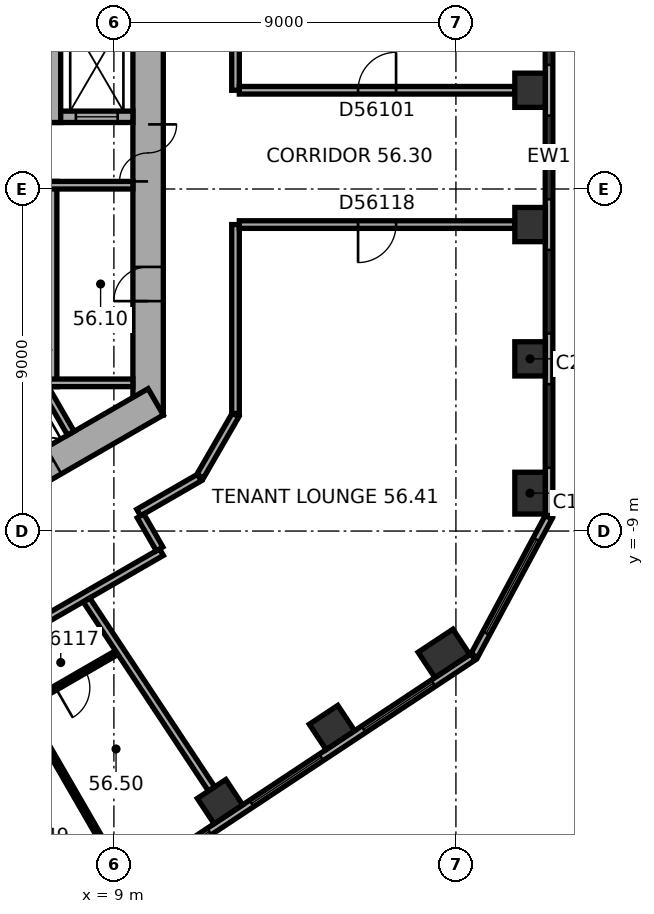
"""IFC4 building model, lengths in metres.
Left out: names, types, materials, properties, quantities, classifications, styles, units other than length and angle.
Written with IfcOpenShell. Run it as: python <this file> out.ifc"""

import sys

from ifc_helpers import new_model, si_unit, direction, frame, frame_2d, origin, origin_2d, place, context, subcontext, project, spatial, rectangle, extrude, element, fill, save


model = new_model("IFC4")
c1 = context("Model", 3, precision=1e-05, world=origin(), true_north=direction((0.0, 1.0)))
c2 = subcontext(c1, "Body", "Model", "MODEL_VIEW")
j1 = project(units=[si_unit("LENGTHUNIT", "METRE"), si_unit("PLANEANGLEUNIT", "RADIAN")], contexts=[c1])
p1 = place(None, origin())
s1 = spatial("IfcSite", under=j1, at=p1, CompositionType="ELEMENT")
p2 = place(p1, origin())
s2 = spatial("IfcBuilding", under=s1, at=p2, CompositionType="ELEMENT")
p3 = place(p2, frame((0.0, 0.0, 229.1)))
s3 = spatial("IfcBuildingStorey", under=s2, at=p3, CompositionType="ELEMENT", Elevation=229.1)
p4 = place(p3, frame((19.95, -8.003, 0.0), z_axis=(0.0, 0.0, 1.0), x_axis=(0.0, 1.0, 0.0)))
e1 = element("IfcColumn", 1, at=p4, inside=s3, PredefinedType="COLUMN", context=c2, shape_type="SweptSolid", body=[
    extrude(rectangle(XDim=1.1, YDim=0.8, at=origin_2d()), origin(), (0.0, 0.0, 1.0), 3.7),
])
for number, where, z_axis, x_axis in (
    (2, (19.95, -4.469, 0.0), (0.0, 0.0, 1.0), (0.0, 1.0, 0.0)),
    (3, (19.95, -0.936, 0.0), (0.0, 0.0, 1.0), (0.0, 1.0, 0.0)),
    (4, (19.95, 2.598, 0.0), (0.0, 0.0, 1.0), (0.0, 1.0, 0.0)),
    (5, (11.791, -16.12, 0.0), (0.0, 0.0, 1.0), (0.834, 0.552, 0.0)),
    (6, (14.738, -14.169, 0.0), (0.0, 0.0, 1.0), (0.834, 0.552, 0.0)),
):
    element("IfcColumn", number, at=place(p3, frame(where, z_axis=z_axis, x_axis=x_axis)), inside=s3, PredefinedType="COLUMN", context=c2, shape_type="SweptSolid", body=[
        extrude(rectangle(XDim=0.9, YDim=0.8, at=origin_2d()), origin(), (0.0, 0.0, 1.0), 3.7),
    ])
p5 = place(p3, frame((17.685, -12.219, 0.0), z_axis=(0.0, 0.0, 1.0), x_axis=(0.833885822067, 0.551936985312, 0.0)))
e7 = element("IfcColumn", 7, at=p5, inside=s3, PredefinedType="COLUMN", context=c2, shape_type="SweptSolid", body=[
    extrude(rectangle(XDim=1.1, YDim=0.8, at=origin_2d()), origin(), (0.0, 0.0, 1.0), 3.7),
])
p6 = place(p3, frame((9.9, -5.947, 0.0), z_axis=(0.0, 0.0, 1.0), x_axis=(0.0, 1.0, 0.0)))
e8 = element("IfcWall", 8, at=p6, inside=s3, PredefinedType="SHEAR", context=c2, shape_type="SweptSolid", body=[
    extrude(rectangle(XDim=11.894, YDim=0.8, at=frame_2d((5.947, 0.0))), origin(), (0.0, 0.0, 1.0), 3.7),
])
p7 = place(p6, frame((6.147, 0.0, 0.0)))
e9 = element("IfcOpeningElement", 9, at=p7, cuts=e8, PredefinedType="OPENING", context=c2, shape_type="SweptSolid", body=[
    extrude(rectangle(XDim=1.5, YDim=2.1, at=frame_2d((0.75, 1.05))), frame((0.0, 0.41, 0.0), z_axis=(0.0, -1.0, 0.0), x_axis=(1.0, 0.0, 0.0)), (0.0, 0.0, 1.0), 0.82),
])
p8 = place(p6, frame((2.997, 0.0, 0.0)))
e10 = element("IfcOpeningElement", 10, at=p8, cuts=e8, PredefinedType="OPENING", context=c2, shape_type="SweptSolid", body=[
    extrude(rectangle(XDim=0.9, YDim=2.1, at=frame_2d((0.45, 1.05))), frame((0.0, 0.41, 0.0), z_axis=(0.0, -1.0, 0.0), x_axis=(1.0, 0.0, 0.0)), (0.0, 0.0, 1.0), 0.82),
])
p9 = place(p3, frame((-0.2, -11.547, 0.0), z_axis=(0.0, 0.0, 1.0), x_axis=(0.866023897231, 0.500002609418, 0.0)))
e11 = element("IfcWall", 11, at=p9, inside=s3, PredefinedType="SHEAR", context=c2, shape_type="SweptSolid", body=[
    extrude(rectangle(XDim=11.894, YDim=0.8, at=frame_2d((5.947, 0.0))), origin(), (0.0, 0.0, 1.0), 3.7),
])
p10 = place(p9, frame((2.497, 0.0, 0.0)))
e12 = element("IfcOpeningElement", 12, at=p10, cuts=e11, PredefinedType="OPENING", context=c2, shape_type="SweptSolid", body=[
    extrude(rectangle(XDim=1.1, YDim=2.1, at=frame_2d((0.55, 1.05))), frame((0.0, 0.41, 0.0), z_axis=(0.0, -1.0, 0.0), x_axis=(1.0, 0.0, 0.0)), (0.0, 0.0, 1.0), 0.82),
])
p11 = place(p9, frame((5.097, 0.0, 0.0)))
e13 = element("IfcOpeningElement", 13, at=p11, cuts=e11, PredefinedType="OPENING", context=c2, shape_type="SweptSolid", body=[
    extrude(rectangle(XDim=1.1, YDim=2.1, at=frame_2d((0.55, 1.05))), frame((0.0, 0.41, 0.0), z_axis=(0.0, -1.0, 0.0), x_axis=(1.0, 0.0, 0.0)), (0.0, 0.0, 1.0), 0.82),
])
p12 = place(p9, frame((7.697, 0.0, 0.0)))
e14 = element("IfcOpeningElement", 14, at=p12, cuts=e11, PredefinedType="OPENING", context=c2, shape_type="SweptSolid", body=[
    extrude(rectangle(XDim=1.1, YDim=2.1, at=frame_2d((0.55, 1.05))), frame((0.0, 0.41, 0.0), z_axis=(0.0, -1.0, 0.0), x_axis=(1.0, 0.0, 0.0)), (0.0, 0.0, 1.0), 0.82),
])
p13 = place(p3, frame((20.45, -8.59, 0.0), z_axis=(0.0, 0.0, 1.0), x_axis=(0.0, 1.0, 0.0)))
e15 = element("IfcWall", 15, at=p13, inside=s3, PredefinedType="STANDARD", context=c2, shape_type="SweptSolid", body=[
    extrude(rectangle(XDim=18.841, YDim=0.2, at=frame_2d((9.421, 0.0))), origin(), (0.0, 0.0, 1.0), 3.7),
])
p14 = place(p13, frame((1.254, 0.0, 0.9)))
e16 = element("IfcOpeningElement", 16, at=p14, cuts=e15, PredefinedType="OPENING", context=c2, shape_type="SweptSolid", body=[
    extrude(rectangle(XDim=2.2, YDim=2.0, at=frame_2d((1.1, 1.0))), frame((0.0, 0.11, 0.0), z_axis=(0.0, -1.0, 0.0), x_axis=(1.0, 0.0, 0.0)), (0.0, 0.0, 1.0), 0.22),
])
p15 = place(p13, frame((4.788, 0.0, 0.9)))
e17 = element("IfcOpeningElement", 17, at=p15, cuts=e15, PredefinedType="OPENING", context=c2, shape_type="SweptSolid", body=[
    extrude(rectangle(XDim=2.2, YDim=2.0, at=frame_2d((1.1, 1.0))), frame((0.0, 0.11, 0.0), z_axis=(0.0, -1.0, 0.0), x_axis=(1.0, 0.0, 0.0)), (0.0, 0.0, 1.0), 0.22),
])
p16 = place(p13, frame((8.322, 0.0, 0.9)))
e18 = element("IfcOpeningElement", 18, at=p16, cuts=e15, PredefinedType="OPENING", context=c2, shape_type="SweptSolid", body=[
    extrude(rectangle(XDim=2.2, YDim=2.0, at=frame_2d((1.1, 1.0))), frame((0.0, 0.11, 0.0), z_axis=(0.0, -1.0, 0.0), x_axis=(1.0, 0.0, 0.0)), (0.0, 0.0, 1.0), 0.22),
])
p17 = place(p13, frame((11.855, 0.0, 0.9)))
e19 = element("IfcOpeningElement", 19, at=p17, cuts=e15, PredefinedType="OPENING", context=c2, shape_type="SweptSolid", body=[
    extrude(rectangle(XDim=2.2, YDim=2.0, at=frame_2d((1.1, 1.0))), frame((0.0, 0.11, 0.0), z_axis=(0.0, -1.0, 0.0), x_axis=(1.0, 0.0, 0.0)), (0.0, 0.0, 1.0), 0.22),
])
p18 = place(p13, frame((15.389, 0.0, 0.9)))
e20 = element("IfcOpeningElement", 20, at=p18, cuts=e15, PredefinedType="OPENING", context=c2, shape_type="SweptSolid", body=[
    extrude(rectangle(XDim=2.2, YDim=2.0, at=frame_2d((1.1, 1.0))), frame((0.0, 0.11, 0.0), z_axis=(0.0, -1.0, 0.0), x_axis=(1.0, 0.0, 0.0)), (0.0, 0.0, 1.0), 0.22),
])
p19 = place(p3, frame((2.739, -22.711, 0.0), z_axis=(0.0, 0.0, 1.0), x_axis=(0.833885723098, 0.551937134838, 0.0)))
e21 = element("IfcWall", 21, at=p19, inside=s3, PredefinedType="STANDARD", context=c2, shape_type="SweptSolid", body=[
    extrude(rectangle(XDim=18.841, YDim=0.2, at=frame_2d((9.421, 0.0))), origin(), (0.0, 0.0, 1.0), 3.7),
])
p20 = place(p19, frame((1.252, 0.0, 0.9)))
e22 = element("IfcOpeningElement", 22, at=p20, cuts=e21, PredefinedType="OPENING", context=c2, shape_type="SweptSolid", body=[
    extrude(rectangle(XDim=2.2, YDim=2.0, at=frame_2d((1.1, 1.0))), frame((0.0, 0.11, 0.0), z_axis=(0.0, -1.0, 0.0), x_axis=(1.0, 0.0, 0.0)), (0.0, 0.0, 1.0), 0.22),
])
p21 = place(p19, frame((4.786, 0.0, 0.9)))
e23 = element("IfcOpeningElement", 23, at=p21, cuts=e21, PredefinedType="OPENING", context=c2, shape_type="SweptSolid", body=[
    extrude(rectangle(XDim=2.2, YDim=2.0, at=frame_2d((1.1, 1.0))), frame((0.0, 0.11, 0.0), z_axis=(0.0, -1.0, 0.0), x_axis=(1.0, 0.0, 0.0)), (0.0, 0.0, 1.0), 0.22),
])
p22 = place(p19, frame((8.32, 0.0, 0.9)))
e24 = element("IfcOpeningElement", 24, at=p22, cuts=e21, PredefinedType="OPENING", context=c2, shape_type="SweptSolid", body=[
    extrude(rectangle(XDim=2.2, YDim=2.0, at=frame_2d((1.1, 1.0))), frame((0.0, 0.11, 0.0), z_axis=(0.0, -1.0, 0.0), x_axis=(1.0, 0.0, 0.0)), (0.0, 0.0, 1.0), 0.22),
])
p23 = place(p19, frame((11.854, 0.0, 0.9)))
e25 = element("IfcOpeningElement", 25, at=p23, cuts=e21, PredefinedType="OPENING", context=c2, shape_type="SweptSolid", body=[
    extrude(rectangle(XDim=2.2, YDim=2.0, at=frame_2d((1.1, 1.0))), frame((0.0, 0.11, 0.0), z_axis=(0.0, -1.0, 0.0), x_axis=(1.0, 0.0, 0.0)), (0.0, 0.0, 1.0), 0.22),
])
p24 = place(p19, frame((15.387, 0.0, 0.9)))
e26 = element("IfcOpeningElement", 26, at=p24, cuts=e21, PredefinedType="OPENING", context=c2, shape_type="SweptSolid", body=[
    extrude(rectangle(XDim=2.2, YDim=2.0, at=frame_2d((1.1, 1.0))), frame((0.0, 0.11, 0.0), z_axis=(0.0, -1.0, 0.0), x_axis=(1.0, 0.0, 0.0)), (0.0, 0.0, 1.0), 0.22),
])
p25 = place(p3, frame((18.483, -12.276, 0.0), z_axis=(0.0, 0.0, 1.0), x_axis=(0.473267675015, 0.880918672629, 0.0)))
e27 = element("IfcWall", 27, at=p25, inside=s3, PredefinedType="STANDARD", context=c2, shape_type="SweptSolid", body=[
    extrude(rectangle(XDim=4.13, YDim=0.2, at=frame_2d((2.065, 0.0))), origin(), (0.0, 0.0, 1.0), 3.7),
])
p26 = place(p25, frame((0.665, 0.0, 0.9)))
e28 = element("IfcOpeningElement", 28, at=p26, cuts=e27, PredefinedType="OPENING", context=c2, shape_type="SweptSolid", body=[
    extrude(rectangle(XDim=2.8, YDim=2.0, at=frame_2d((1.4, 1.0))), frame((0.0, 0.11, 0.0), z_axis=(0.0, -1.0, 0.0), x_axis=(1.0, 0.0, 0.0)), (0.0, 0.0, 1.0), 0.22),
])
p27 = place(p3, frame((7.4, -5.2, 0.0), z_axis=(0.0, 0.0, 1.0), x_axis=(0.0, 1.0, 0.0)))
e29 = element("IfcWall", 29, at=p27, inside=s3, PredefinedType="PARTITIONING", context=c2, shape_type="SweptSolid", body=[
    extrude(rectangle(XDim=5.4, YDim=0.2, at=frame_2d((2.7, 0.0))), origin(), (0.0, 0.0, 1.0), 3.42),
])
for number, where, z_axis, x_axis in (
    (30, (7.3, -5.1, 0.0), (0.0, 0.0, 1.0), (1.0, 0.0, 0.0)),
    (31, (7.3, 0.1, 0.0), (0.0, 0.0, 1.0), (1.0, 0.0, 0.0)),
    (32, (6.768, -4.522, 0.0), (0.0, 0.0, 1.0), (0.5, -0.866, 0.0)),
):
    element("IfcWall", number, at=place(p3, frame(where, z_axis=z_axis, x_axis=x_axis)), inside=s3, PredefinedType="PARTITIONING", context=c2, shape_type="SweptSolid", body=[
        extrude(rectangle(XDim=2.2, YDim=0.2, at=frame_2d((1.1, 0.0))), origin(), (0.0, 0.0, 1.0), 3.42),
    ])
p28 = place(p3, frame((7.3, 1.9, 0.0), z_axis=(0.0, 0.0, 1.0), x_axis=(1.0, 0.0, 0.0)))
e33 = element("IfcWall", 33, at=p28, inside=s3, PredefinedType="SHEAR", context=c2, shape_type="SweptSolid", body=[
    extrude(rectangle(XDim=2.2, YDim=0.3, at=frame_2d((1.1, 0.0))), origin(), (0.0, 0.0, 1.0), 3.42),
])
p29 = place(p28, frame((0.7, 0.0, 0.0)))
e34 = element("IfcOpeningElement", 34, at=p29, cuts=e33, PredefinedType="OPENING", context=c2, shape_type="SweptSolid", body=[
    extrude(rectangle(XDim=1.1, YDim=2.1, at=frame_2d((0.55, 1.05))), frame((0.0, 0.16, 0.0), z_axis=(0.0, -1.0, 0.0), x_axis=(1.0, 0.0, 0.0)), (0.0, 0.0, 1.0), 0.32),
])
p30 = place(p3, frame((7.45, 1.75, 0.0), z_axis=(0.0, 0.0, 1.0), x_axis=(0.0, 1.0, 0.0)))
e35 = element("IfcWall", 35, at=p30, inside=s3, PredefinedType="SHEAR", context=c2, shape_type="SweptSolid", body=[
    extrude(rectangle(XDim=3.35, YDim=0.3, at=frame_2d((1.675, 0.0))), origin(), (0.0, 0.0, 1.0), 3.42),
])
p31 = place(p3, frame((2.716, -13.906, 0.0), z_axis=(0.0, 0.0, 1.0), x_axis=(0.866040290674, 0.499974214264, 0.0)))
e36 = element("IfcWall", 36, at=p31, inside=s3, PredefinedType="PARTITIONING", context=c2, shape_type="SweptSolid", body=[
    extrude(rectangle(XDim=8.702, YDim=0.2, at=frame_2d((4.351, 0.0))), origin(), (0.0, 0.0, 1.0), 3.42),
])
p32 = place(p31, frame((2.679, 0.0, 0.0)))
e37 = element("IfcOpeningElement", 37, at=p32, cuts=e36, PredefinedType="OPENING", context=c2, shape_type="SweptSolid", body=[
    extrude(rectangle(XDim=1.0, YDim=2.1, at=frame_2d((0.5, 1.05))), frame((0.0, 0.11, 0.0), z_axis=(0.0, -1.0, 0.0), x_axis=(1.0, 0.0, 0.0)), (0.0, 0.0, 1.0), 0.22),
])
p33 = place(p3, frame((3.117, -15.638, 0.0), z_axis=(0.0, 0.0, 1.0), x_axis=(0.866031365477, 0.499989673903, 0.0)))
e38 = element("IfcWall", 38, at=p33, inside=s3, PredefinedType="PARTITIONING", context=c2, shape_type="SweptSolid", body=[
    extrude(rectangle(XDim=6.881, YDim=0.12, at=frame_2d((3.44, 0.0))), origin(), (0.0, 0.0, 1.0), 3.42),
])
p34 = place(p33, frame((0.5, 0.0, 0.0)))
e39 = element("IfcOpeningElement", 39, at=p34, cuts=e38, PredefinedType="OPENING", context=c2, shape_type="SweptSolid", body=[
    extrude(rectangle(XDim=1.0, YDim=2.1, at=frame_2d((0.5, 1.05))), frame((0.0, 0.07, 0.0), z_axis=(0.0, -1.0, 0.0), x_axis=(1.0, 0.0, 0.0)), (0.0, 0.0, 1.0), 0.14),
])
p35 = place(p33, frame((2.583, 0.0, 0.0)))
e40 = element("IfcOpeningElement", 40, at=p35, cuts=e38, PredefinedType="OPENING", context=c2, shape_type="SweptSolid", body=[
    extrude(rectangle(XDim=0.9, YDim=2.1, at=frame_2d((0.45, 1.05))), frame((0.0, 0.07, 0.0), z_axis=(0.0, -1.0, 0.0), x_axis=(1.0, 0.0, 0.0)), (0.0, 0.0, 1.0), 0.14),
])
p36 = place(p33, frame((5.023, 0.0, 0.0)))
e41 = element("IfcOpeningElement", 41, at=p36, cuts=e38, PredefinedType="OPENING", context=c2, shape_type="SweptSolid", body=[
    extrude(rectangle(XDim=0.9, YDim=2.1, at=frame_2d((0.45, 1.05))), frame((0.0, 0.07, 0.0), z_axis=(0.0, -1.0, 0.0), x_axis=(1.0, 0.0, 0.0)), (0.0, 0.0, 1.0), 0.14),
])
p37 = place(p3, frame((8.912, -17.545, 0.0), z_axis=(0.0, 0.0, 1.0), x_axis=(-0.500022113525, 0.866012636158, 0.0)))
e42 = element("IfcWall", 42, at=p37, inside=s3, PredefinedType="PARTITIONING", context=c2, shape_type="SweptSolid", body=[
    extrude(rectangle(XDim=4.49, YDim=0.12, at=frame_2d((2.245, 0.0))), origin(), (0.0, 0.0, 1.0), 2.87),
])
p38 = place(p3, frame((9.652, -8.515, 0.0), z_axis=(0.0, 0.0, 1.0), x_axis=(0.866020375458, 0.500008709215, 0.0)))
e43 = element("IfcWall", 43, at=p38, inside=s3, PredefinedType="PARTITIONING", context=c2, shape_type="SweptSolid", body=[
    extrude(rectangle(XDim=1.846, YDim=0.2, at=frame_2d((0.923, 0.0))), origin(), (0.0, 0.0, 1.0), 3.42),
])
p39 = place(p3, frame((10.202, -9.469, 0.0), z_axis=(0.0, 0.0, 1.0), x_axis=(-0.499968756647, 0.866043441391, 0.0)))
e44 = element("IfcWall", 44, at=p39, inside=s3, PredefinedType="PARTITIONING", context=c2, shape_type="SweptSolid", body=[
    extrude(rectangle(XDim=1.001, YDim=0.2, at=frame_2d((0.5, 0.0))), origin(), (0.0, 0.0, 1.0), 3.42),
])
p40 = place(p3, frame((11.27, -7.558, 0.0), z_axis=(0.0, 0.0, 1.0), x_axis=(0.499964847546, 0.866045698112, 0.0)))
e45 = element("IfcWall", 45, at=p40, inside=s3, PredefinedType="PARTITIONING", context=c2, shape_type="SweptSolid", body=[
    extrude(rectangle(XDim=1.86, YDim=0.2, at=frame_2d((0.93, 0.0))), origin(), (0.0, 0.0, 1.0), 3.42),
])
p41 = place(p3, frame((11.571, -15.786, 0.0), z_axis=(0.0, 0.0, 1.0), x_axis=(-0.551944861763, 0.833880608705, 0.0)))
e46 = element("IfcWall", 46, at=p41, inside=s3, PredefinedType="PARTITIONING", context=c2, shape_type="SweptSolid", body=[
    extrude(rectangle(XDim=5.957, YDim=0.2, at=frame_2d((2.979, 0.0))), origin(), (0.0, 0.0, 1.0), 3.42),
])
p42 = place(p3, frame((12.2, -5.907, 0.0), z_axis=(0.0, 0.0, 1.0), x_axis=(0.0, 1.0, 0.0)))
e47 = element("IfcWall", 47, at=p42, inside=s3, PredefinedType="PARTITIONING", context=c2, shape_type="SweptSolid", body=[
    extrude(rectangle(XDim=4.971, YDim=0.2, at=frame_2d((2.486, 0.0))), origin(), (0.0, 0.0, 1.0), 3.42),
])
p43 = place(p3, frame((12.2, 2.598, 0.0), z_axis=(0.0, 0.0, 1.0), x_axis=(0.0, 1.0, 0.0)))
e48 = element("IfcWall", 48, at=p43, inside=s3, PredefinedType="PARTITIONING", context=c2, shape_type="SweptSolid", body=[
    extrude(rectangle(XDim=3.349, YDim=0.2, at=frame_2d((1.674, 0.0))), origin(), (0.0, 0.0, 1.0), 3.42),
])
p44 = place(p3, frame((12.3, -0.936, 0.0), z_axis=(0.0, 0.0, 1.0), x_axis=(1.0, 0.0, 0.0)))
e49 = element("IfcWall", 49, at=p44, inside=s3, PredefinedType="PARTITIONING", context=c2, shape_type="SweptSolid", body=[
    extrude(rectangle(XDim=7.25, YDim=0.2, at=frame_2d((3.625, 0.0))), origin(), (0.0, 0.0, 1.0), 2.87),
])
p45 = place(p44, frame((3.125, 0.0, 0.0)))
e50 = element("IfcOpeningElement", 50, at=p45, cuts=e49, PredefinedType="OPENING", context=c2, shape_type="SweptSolid", body=[
    extrude(rectangle(XDim=1.0, YDim=2.1, at=frame_2d((0.5, 1.05))), frame((0.0, 0.11, 0.0), z_axis=(0.0, -1.0, 0.0), x_axis=(1.0, 0.0, 0.0)), (0.0, 0.0, 1.0), 0.22),
])
p46 = place(p3, frame((19.55, 2.598, 0.0), z_axis=(0.0, 0.0, 1.0), x_axis=(-1.0, 0.0, 0.0)))
e51 = element("IfcWall", 51, at=p46, inside=s3, PredefinedType="PARTITIONING", context=c2, shape_type="SweptSolid", body=[
    extrude(rectangle(XDim=7.25, YDim=0.2, at=frame_2d((3.625, 0.0))), origin(), (0.0, 0.0, 1.0), 3.42),
])
p47 = place(p46, frame((3.125, 0.0, 0.0)))
e52 = element("IfcOpeningElement", 52, at=p47, cuts=e51, PredefinedType="OPENING", context=c2, shape_type="SweptSolid", body=[
    extrude(rectangle(XDim=1.0, YDim=2.1, at=frame_2d((0.5, 1.05))), frame((0.0, 0.11, 0.0), z_axis=(0.0, -1.0, 0.0), x_axis=(1.0, 0.0, 0.0)), (0.0, 0.0, 1.0), 0.22),
])
p48 = place(p14, origin())
e53 = element("IfcWindow", 53, at=p48, inside=s3, PartitioningType="SINGLE_PANEL", PredefinedType="WINDOW", context=c2, shape_type="SweptSolid", body=[
    extrude(rectangle(XDim=2.2, YDim=2.0, at=frame_2d((1.1, 1.0))), frame((0.0, 0.03, 0.0), z_axis=(0.0, -1.0, 0.0), x_axis=(1.0, 0.0, 0.0)), (0.0, 0.0, 1.0), 0.06),
])
fill(e16, e53)
p49 = place(p15, origin())
e54 = element("IfcWindow", 54, at=p49, inside=s3, PartitioningType="SINGLE_PANEL", PredefinedType="WINDOW", context=c2, shape_type="SweptSolid", body=[
    extrude(rectangle(XDim=2.2, YDim=2.0, at=frame_2d((1.1, 1.0))), frame((0.0, 0.03, 0.0), z_axis=(0.0, -1.0, 0.0), x_axis=(1.0, 0.0, 0.0)), (0.0, 0.0, 1.0), 0.06),
])
fill(e17, e54)
p50 = place(p16, origin())
e55 = element("IfcWindow", 55, at=p50, inside=s3, PartitioningType="SINGLE_PANEL", PredefinedType="WINDOW", context=c2, shape_type="SweptSolid", body=[
    extrude(rectangle(XDim=2.2, YDim=2.0, at=frame_2d((1.1, 1.0))), frame((0.0, 0.03, 0.0), z_axis=(0.0, -1.0, 0.0), x_axis=(1.0, 0.0, 0.0)), (0.0, 0.0, 1.0), 0.06),
])
fill(e18, e55)
p51 = place(p17, origin())
e56 = element("IfcWindow", 56, at=p51, inside=s3, PartitioningType="SINGLE_PANEL", PredefinedType="WINDOW", context=c2, shape_type="SweptSolid", body=[
    extrude(rectangle(XDim=2.2, YDim=2.0, at=frame_2d((1.1, 1.0))), frame((0.0, 0.03, 0.0), z_axis=(0.0, -1.0, 0.0), x_axis=(1.0, 0.0, 0.0)), (0.0, 0.0, 1.0), 0.06),
])
fill(e19, e56)
p52 = place(p22, origin())
e57 = element("IfcWindow", 57, at=p52, inside=s3, PartitioningType="SINGLE_PANEL", PredefinedType="WINDOW", context=c2, shape_type="SweptSolid", body=[
    extrude(rectangle(XDim=2.2, YDim=2.0, at=frame_2d((1.1, 1.0))), frame((0.0, 0.03, 0.0), z_axis=(0.0, -1.0, 0.0), x_axis=(1.0, 0.0, 0.0)), (0.0, 0.0, 1.0), 0.06),
])
fill(e24, e57)
p53 = place(p23, origin())
e58 = element("IfcWindow", 58, at=p53, inside=s3, PartitioningType="SINGLE_PANEL", PredefinedType="WINDOW", context=c2, shape_type="SweptSolid", body=[
    extrude(rectangle(XDim=2.2, YDim=2.0, at=frame_2d((1.1, 1.0))), frame((0.0, 0.03, 0.0), z_axis=(0.0, -1.0, 0.0), x_axis=(1.0, 0.0, 0.0)), (0.0, 0.0, 1.0), 0.06),
])
fill(e25, e58)
p54 = place(p24, origin())
e59 = element("IfcWindow", 59, at=p54, inside=s3, PartitioningType="SINGLE_PANEL", PredefinedType="WINDOW", context=c2, shape_type="SweptSolid", body=[
    extrude(rectangle(XDim=2.2, YDim=2.0, at=frame_2d((1.1, 1.0))), frame((0.0, 0.03, 0.0), z_axis=(0.0, -1.0, 0.0), x_axis=(1.0, 0.0, 0.0)), (0.0, 0.0, 1.0), 0.06),
])
fill(e26, e59)
p55 = place(p26, origin())
e60 = element("IfcWindow", 60, at=p55, inside=s3, PartitioningType="SINGLE_PANEL", PredefinedType="WINDOW", context=c2, shape_type="SweptSolid", body=[
    extrude(rectangle(XDim=2.8, YDim=2.0, at=frame_2d((1.4, 1.0))), frame((0.0, 0.03, 0.0), z_axis=(0.0, -1.0, 0.0), x_axis=(1.0, 0.0, 0.0)), (0.0, 0.0, 1.0), 0.06),
])
fill(e28, e60)
p56 = place(p7, origin())
e61 = element("IfcDoor", 61, at=p56, inside=s3, OperationType="DOUBLE_DOOR_SINGLE_SWING", PredefinedType="DOOR", context=c2, shape_type="SweptSolid", body=[
    extrude(rectangle(XDim=1.5, YDim=2.1, at=frame_2d((0.75, 1.05))), frame((0.0, 0.025, 0.0), z_axis=(0.0, -1.0, 0.0), x_axis=(1.0, 0.0, 0.0)), (0.0, 0.0, 1.0), 0.05),
])
fill(e9, e61)
p57 = place(p8, origin())
e62 = element("IfcDoor", 62, at=p57, inside=s3, OperationType="SINGLE_SWING_LEFT", PredefinedType="DOOR", context=c2, shape_type="SweptSolid", body=[
    extrude(rectangle(XDim=0.9, YDim=2.1, at=frame_2d((0.45, 1.05))), frame((0.0, 0.025, 0.0), z_axis=(0.0, -1.0, 0.0), x_axis=(1.0, 0.0, 0.0)), (0.0, 0.0, 1.0), 0.05),
])
fill(e10, e62)
p58 = place(p29, origin())
e63 = element("IfcDoor", 63, at=p58, inside=s3, OperationType="DOUBLE_DOOR_SLIDING", PredefinedType="DOOR", context=c2, shape_type="SweptSolid", body=[
    extrude(rectangle(XDim=1.1, YDim=2.1, at=frame_2d((0.55, 1.05))), frame((0.0, 0.025, 0.0), z_axis=(0.0, -1.0, 0.0), x_axis=(1.0, 0.0, 0.0)), (0.0, 0.0, 1.0), 0.05),
])
fill(e34, e63)
p59 = place(p12, origin())
e64 = element("IfcDoor", 64, at=p59, inside=s3, OperationType="DOUBLE_DOOR_SLIDING", PredefinedType="DOOR", context=c2, shape_type="SweptSolid", body=[
    extrude(rectangle(XDim=1.1, YDim=2.1, at=frame_2d((0.55, 1.05))), frame((0.0, 0.025, 0.0), z_axis=(0.0, -1.0, 0.0), x_axis=(1.0, 0.0, 0.0)), (0.0, 0.0, 1.0), 0.05),
])
fill(e14, e64)
p60 = place(p47, origin())
e65 = element("IfcDoor", 65, at=p60, inside=s3, OperationType="SINGLE_SWING_LEFT", PredefinedType="DOOR", context=c2, shape_type="SweptSolid", body=[
    extrude(rectangle(XDim=1.0, YDim=2.1, at=frame_2d((0.5, 1.05))), frame((0.0, 0.025, 0.0), z_axis=(0.0, -1.0, 0.0), x_axis=(1.0, 0.0, 0.0)), (0.0, 0.0, 1.0), 0.05),
])
fill(e52, e65)
p61 = place(p36, origin())
e66 = element("IfcDoor", 66, at=p61, inside=s3, OperationType="SINGLE_SWING_LEFT", PredefinedType="DOOR", context=c2, shape_type="SweptSolid", body=[
    extrude(rectangle(XDim=0.9, YDim=2.1, at=frame_2d((0.45, 1.05))), frame((0.0, 0.025, 0.0), z_axis=(0.0, -1.0, 0.0), x_axis=(1.0, 0.0, 0.0)), (0.0, 0.0, 1.0), 0.05),
])
fill(e41, e66)
p62 = place(p45, origin())
e67 = element("IfcDoor", 67, at=p62, inside=s3, OperationType="SINGLE_SWING_LEFT", PredefinedType="DOOR", context=c2, shape_type="SweptSolid", body=[
    extrude(rectangle(XDim=1.0, YDim=2.1, at=frame_2d((0.5, 1.05))), frame((0.0, 0.025, 0.0), z_axis=(0.0, -1.0, 0.0), x_axis=(1.0, 0.0, 0.0)), (0.0, 0.0, 1.0), 0.05),
])
fill(e50, e67)
save(model, sys.argv[1])
